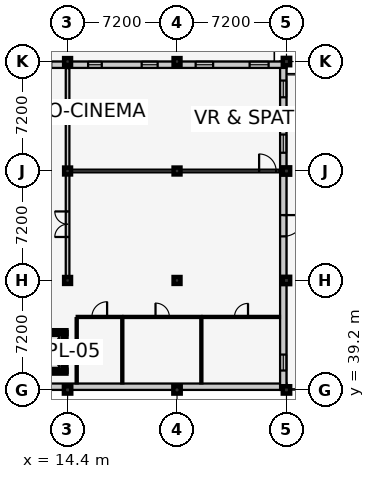
"""IFC4 building model, lengths in metres.
Left out: names, types, materials, properties, quantities, classifications, styles, units other than length and angle.
Written with IfcOpenShell. Run it as: python <this file> out.ifc"""

import sys

from ifc_helpers import new_model, si_unit, direction, frame, frame_2d, origin, origin_2d, place, context, subcontext, project, spatial, rectangle, extrude, element, fill, save


model = new_model("IFC4")
c1 = context("Model", 3, precision=1e-05, world=origin(), true_north=direction((0.0, 1.0)))
c2 = subcontext(c1, "Body", "Model", "MODEL_VIEW")
j1 = project(units=[si_unit("LENGTHUNIT", "METRE"), si_unit("PLANEANGLEUNIT", "RADIAN")], contexts=[c1])
p1 = place(None, origin())
s1 = spatial("IfcSite", under=j1, at=p1, CompositionType="ELEMENT")
p2 = place(p1, origin())
s2 = spatial("IfcBuilding", under=s1, at=p2, CompositionType="ELEMENT")
p3 = place(p2, frame((0.0, 0.0, 13.8)))
s3 = spatial("IfcBuildingStorey", under=s2, at=p3, CompositionType="ELEMENT", Elevation=13.8)
p4 = place(p3, frame((14.4, 39.2, 0.0), z_axis=(0.0, 0.0, 1.0), x_axis=(1.0, 0.0, 0.0)))
e1 = element("IfcColumn", 1, at=p4, inside=s3, PredefinedType="COLUMN", context=c2, shape_type="SweptSolid", body=[
    extrude(rectangle(XDim=0.48, YDim=0.48, at=origin_2d()), origin(), (0.0, 0.0, 1.0), 4.2),
])
for number, where, z_axis, x_axis in (
    (2, (14.4, 46.4, 0.0), (0.0, 0.0, 1.0), (1.0, 0.0, 0.0)),
    (3, (14.4, 53.6, 0.0), (0.0, 0.0, 1.0), (1.0, 0.0, 0.0)),
    (4, (14.4, 60.8, 0.0), (0.0, 0.0, 1.0), (1.0, 0.0, 0.0)),
):
    element("IfcColumn", number, at=place(p3, frame(where, z_axis=z_axis, x_axis=x_axis)), inside=s3, PredefinedType="COLUMN", context=c2, shape_type="SweptSolid", body=[
        extrude(rectangle(XDim=0.45, YDim=0.45, at=origin_2d()), origin(), (0.0, 0.0, 1.0), 4.2),
    ])
p5 = place(p3, frame((21.6, 39.2, 0.0), z_axis=(0.0, 0.0, 1.0), x_axis=(1.0, 0.0, 0.0)))
e5 = element("IfcColumn", 5, at=p5, inside=s3, PredefinedType="COLUMN", context=c2, shape_type="SweptSolid", body=[
    extrude(rectangle(XDim=0.48, YDim=0.48, at=origin_2d()), origin(), (0.0, 0.0, 1.0), 4.2),
])
for number, where, z_axis, x_axis in (
    (6, (21.6, 46.4, 0.0), (0.0, 0.0, 1.0), (1.0, 0.0, 0.0)),
    (7, (21.6, 53.6, 0.0), (0.0, 0.0, 1.0), (1.0, 0.0, 0.0)),
    (8, (21.6, 60.8, 0.0), (0.0, 0.0, 1.0), (1.0, 0.0, 0.0)),
):
    element("IfcColumn", number, at=place(p3, frame(where, z_axis=z_axis, x_axis=x_axis)), inside=s3, PredefinedType="COLUMN", context=c2, shape_type="SweptSolid", body=[
        extrude(rectangle(XDim=0.45, YDim=0.45, at=origin_2d()), origin(), (0.0, 0.0, 1.0), 4.2),
    ])
for number, where, z_axis, x_axis in (
    (9, (28.8, 39.2, 0.0), (0.0, 0.0, 1.0), (1.0, 0.0, 0.0)),
    (10, (28.8, 46.4, 0.0), (0.0, 0.0, 1.0), (1.0, 0.0, 0.0)),
    (11, (28.8, 53.6, 0.0), (0.0, 0.0, 1.0), (1.0, 0.0, 0.0)),
    (12, (28.8, 60.8, 0.0), (0.0, 0.0, 1.0), (1.0, 0.0, 0.0)),
):
    element("IfcColumn", number, at=place(p3, frame(where, z_axis=z_axis, x_axis=x_axis)), inside=s3, PredefinedType="COLUMN", context=c2, shape_type="SweptSolid", body=[
        extrude(rectangle(XDim=0.48, YDim=0.48, at=origin_2d()), origin(), (0.0, 0.0, 1.0), 4.2),
    ])
p6 = place(p3, frame((28.8, 39.41, 0.0), z_axis=(0.0, 0.0, 1.0), x_axis=(-1.0, 0.0, 0.0)))
e13 = element("IfcWall", 13, at=p6, inside=s3, PredefinedType="SOLIDWALL", context=c2, shape_type="SweptSolid", body=[
    extrude(rectangle(XDim=28.8, YDim=0.42, at=frame_2d((14.4, 0.0))), origin(), (0.0, 0.0, 1.0), 3.245),
])
p7 = place(p3, frame((28.59, 60.8, 0.0), z_axis=(0.0, 0.0, 1.0), x_axis=(0.0, -1.0, 0.0)))
e14 = element("IfcWall", 14, at=p7, inside=s3, PredefinedType="SOLIDWALL", context=c2, shape_type="SweptSolid", body=[
    extrude(rectangle(XDim=21.6, YDim=0.42, at=frame_2d((10.8, 0.0))), origin(), (0.0, 0.0, 1.0), 3.205),
])
p8 = place(p7, frame((10.1, 0.0, 0.0)))
e15 = element("IfcOpeningElement", 15, at=p8, cuts=e14, PredefinedType="OPENING", context=c2, shape_type="SweptSolid", body=[
    extrude(rectangle(XDim=1.4, YDim=2.2, at=frame_2d((0.7, 1.1))), frame((0.0, 0.222, 0.0), z_axis=(0.0, -1.0, 0.0), x_axis=(1.0, 0.0, 0.0)), (0.0, 0.0, 1.0), 0.444),
])
p9 = place(p7, frame((1.25, 0.0, 0.9)))
e16 = element("IfcOpeningElement", 16, at=p9, cuts=e14, PredefinedType="OPENING", context=c2, shape_type="SweptSolid", body=[
    extrude(rectangle(XDim=1.1, YDim=1.35, at=frame_2d((0.55, 0.675))), frame((0.0, 0.222, 0.0), z_axis=(0.0, -1.0, 0.0), x_axis=(1.0, 0.0, 0.0)), (0.0, 0.0, 1.0), 0.444),
])
p10 = place(p7, frame((4.8, 0.0, 0.9)))
e17 = element("IfcOpeningElement", 17, at=p10, cuts=e14, PredefinedType="OPENING", context=c2, shape_type="SweptSolid", body=[
    extrude(rectangle(XDim=1.2, YDim=1.35, at=frame_2d((0.6, 0.675))), frame((0.0, 0.222, 0.0), z_axis=(0.0, -1.0, 0.0), x_axis=(1.0, 0.0, 0.0)), (0.0, 0.0, 1.0), 0.444),
])
p11 = place(p7, frame((19.275, 0.0, 0.9)))
e18 = element("IfcOpeningElement", 18, at=p11, cuts=e14, PredefinedType="OPENING", context=c2, shape_type="SweptSolid", body=[
    extrude(rectangle(XDim=1.05, YDim=1.45, at=frame_2d((0.525, 0.725))), frame((0.0, 0.222, 0.0), z_axis=(0.0, -1.0, 0.0), x_axis=(1.0, 0.0, 0.0)), (0.0, 0.0, 1.0), 0.444),
])
p12 = place(p3, frame((0.0, 60.59, 0.0), z_axis=(0.0, 0.0, 1.0), x_axis=(1.0, 0.0, 0.0)))
e19 = element("IfcWall", 19, at=p12, inside=s3, PredefinedType="SOLIDWALL", context=c2, shape_type="SweptSolid", body=[
    extrude(rectangle(XDim=28.8, YDim=0.42, at=frame_2d((14.4, 0.0))), origin(), (0.0, 0.0, 1.0), 3.085),
])
p13 = place(p12, frame((1.225, 0.0, 0.9)))
e20 = element("IfcOpeningElement", 20, at=p13, cuts=e19, PredefinedType="OPENING", context=c2, shape_type="SweptSolid", body=[
    extrude(rectangle(XDim=1.15, YDim=1.45, at=frame_2d((0.575, 0.725))), frame((0.0, 0.222, 0.0), z_axis=(0.0, -1.0, 0.0), x_axis=(1.0, 0.0, 0.0)), (0.0, 0.0, 1.0), 0.444),
])
p14 = place(p12, frame((4.775, 0.0, 0.9)))
e21 = element("IfcOpeningElement", 21, at=p14, cuts=e19, PredefinedType="OPENING", context=c2, shape_type="SweptSolid", body=[
    extrude(rectangle(XDim=1.25, YDim=1.45, at=frame_2d((0.625, 0.725))), frame((0.0, 0.222, 0.0), z_axis=(0.0, -1.0, 0.0), x_axis=(1.0, 0.0, 0.0)), (0.0, 0.0, 1.0), 0.444),
])
p15 = place(p12, frame((8.325, 0.0, 0.9)))
e22 = element("IfcOpeningElement", 22, at=p15, cuts=e19, PredefinedType="OPENING", context=c2, shape_type="SweptSolid", body=[
    extrude(rectangle(XDim=1.35, YDim=1.45, at=frame_2d((0.675, 0.725))), frame((0.0, 0.222, 0.0), z_axis=(0.0, -1.0, 0.0), x_axis=(1.0, 0.0, 0.0)), (0.0, 0.0, 1.0), 0.444),
])
p16 = place(p12, frame((11.875, 0.0, 0.9)))
e23 = element("IfcOpeningElement", 23, at=p16, cuts=e19, PredefinedType="OPENING", context=c2, shape_type="SweptSolid", body=[
    extrude(rectangle(XDim=1.45, YDim=1.45, at=frame_2d((0.725, 0.725))), frame((0.0, 0.222, 0.0), z_axis=(0.0, -1.0, 0.0), x_axis=(1.0, 0.0, 0.0)), (0.0, 0.0, 1.0), 0.444),
])
p17 = place(p12, frame((15.75, 0.0, 0.9)))
e24 = element("IfcOpeningElement", 24, at=p17, cuts=e19, PredefinedType="OPENING", context=c2, shape_type="SweptSolid", body=[
    extrude(rectangle(XDim=0.9, YDim=1.6, at=frame_2d((0.45, 0.8))), frame((0.0, 0.222, 0.0), z_axis=(0.0, -1.0, 0.0), x_axis=(1.0, 0.0, 0.0)), (0.0, 0.0, 1.0), 0.444),
])
p18 = place(p12, frame((19.275, 0.0, 0.9)))
e25 = element("IfcOpeningElement", 25, at=p18, cuts=e19, PredefinedType="OPENING", context=c2, shape_type="SweptSolid", body=[
    extrude(rectangle(XDim=1.05, YDim=1.6, at=frame_2d((0.525, 0.8))), frame((0.0, 0.222, 0.0), z_axis=(0.0, -1.0, 0.0), x_axis=(1.0, 0.0, 0.0)), (0.0, 0.0, 1.0), 0.444),
])
p19 = place(p12, frame((22.825, 0.0, 0.9)))
e26 = element("IfcOpeningElement", 26, at=p19, cuts=e19, PredefinedType="OPENING", context=c2, shape_type="SweptSolid", body=[
    extrude(rectangle(XDim=1.15, YDim=1.6, at=frame_2d((0.575, 0.8))), frame((0.0, 0.222, 0.0), z_axis=(0.0, -1.0, 0.0), x_axis=(1.0, 0.0, 0.0)), (0.0, 0.0, 1.0), 0.444),
])
p20 = place(p12, frame((26.375, 0.0, 0.9)))
e27 = element("IfcOpeningElement", 27, at=p20, cuts=e19, PredefinedType="OPENING", context=c2, shape_type="SweptSolid", body=[
    extrude(rectangle(XDim=1.25, YDim=1.6, at=frame_2d((0.625, 0.8))), frame((0.0, 0.222, 0.0), z_axis=(0.0, -1.0, 0.0), x_axis=(1.0, 0.0, 0.0)), (0.0, 0.0, 1.0), 0.444),
])
p21 = place(p3, frame((12.275, 40.4, 0.0), z_axis=(0.0, 0.0, 1.0), x_axis=(1.0, 0.0, 0.0)))
e28 = element("IfcWall", 28, at=p21, inside=s3, PredefinedType="SHEAR", context=c2, shape_type="SweptSolid", body=[
    extrude(rectangle(XDim=2.05, YDim=0.25, at=frame_2d((1.025, 0.0))), origin(), (0.0, 0.0, 1.0), 3.96),
])
p22 = place(p3, frame((14.325, 43.0, 0.0), z_axis=(0.0, 0.0, 1.0), x_axis=(-1.0, 0.0, 0.0)))
e29 = element("IfcWall", 29, at=p22, inside=s3, PredefinedType="SHEAR", context=c2, shape_type="SweptSolid", body=[
    extrude(rectangle(XDim=2.05, YDim=0.25, at=frame_2d((1.025, 0.0))), origin(), (0.0, 0.0, 1.0), 3.96),
])
p23 = place(p22, frame((0.55, 0.0, 0.0)))
e30 = element("IfcOpeningElement", 30, at=p23, cuts=e29, PredefinedType="OPENING", context=c2, shape_type="SweptSolid", body=[
    extrude(rectangle(XDim=0.95, YDim=2.1, at=frame_2d((0.475, 1.05))), frame((0.0, 0.137, 0.0), z_axis=(0.0, -1.0, 0.0), x_axis=(1.0, 0.0, 0.0)), (0.0, 0.0, 1.0), 0.274),
])
p24 = place(p3, frame((14.2, 40.4, 0.0), z_axis=(0.0, 0.0, 1.0), x_axis=(0.0, 1.0, 0.0)))
e31 = element("IfcWall", 31, at=p24, inside=s3, PredefinedType="SHEAR", context=c2, shape_type="SweptSolid", body=[
    extrude(rectangle(XDim=2.6, YDim=0.25, at=frame_2d((1.3, 0.0))), origin(), (0.0, 0.0, 1.0), 3.96),
])
p25 = place(p3, frame((14.4, 46.6, 0.0), z_axis=(0.0, 0.0, 1.0), x_axis=(0.0, 1.0, 0.0)))
e32 = element("IfcWall", 32, at=p25, inside=s3, PredefinedType="PARTITIONING", context=c2, shape_type="SweptSolid", body=[
    extrude(rectangle(XDim=13.77, YDim=0.24, at=frame_2d((6.885, 0.0))), origin(), (0.0, 0.0, 1.0), 3.335),
])
p26 = place(p25, frame((2.66, 0.0, 0.0)))
e33 = element("IfcOpeningElement", 33, at=p26, cuts=e32, PredefinedType="OPENING", context=c2, shape_type="SweptSolid", body=[
    extrude(rectangle(XDim=1.68, YDim=2.3, at=frame_2d((0.84, 1.15))), frame((0.0, 0.132, 0.0), z_axis=(0.0, -1.0, 0.0), x_axis=(1.0, 0.0, 0.0)), (0.0, 0.0, 1.0), 0.264),
])
p27 = place(p3, frame((14.53, 53.6, 0.0), z_axis=(0.0, 0.0, 1.0), x_axis=(1.0, 0.0, 0.0)))
e34 = element("IfcWall", 34, at=p27, inside=s3, PredefinedType="PARTITIONING", context=c2, shape_type="SweptSolid", body=[
    extrude(rectangle(XDim=13.84, YDim=0.18, at=frame_2d((6.92, 0.0))), origin(), (0.0, 0.0, 1.0), 3.085),
])
p28 = place(p27, frame((12.47, 0.0, 0.0)))
e35 = element("IfcOpeningElement", 35, at=p28, cuts=e34, PredefinedType="OPENING", context=c2, shape_type="SweptSolid", body=[
    extrude(rectangle(XDim=1.12, YDim=2.15, at=frame_2d((0.56, 1.075))), frame((0.0, 0.102, 0.0), z_axis=(0.0, -1.0, 0.0), x_axis=(1.0, 0.0, 0.0)), (0.0, 0.0, 1.0), 0.204),
])
p29 = place(p3, frame((15.0, 44.0, 0.0), z_axis=(0.0, 0.0, 1.0), x_axis=(1.0, 0.0, 0.0)))
e36 = element("IfcWall", 36, at=p29, inside=s3, PredefinedType="PARTITIONING", context=c2, shape_type="SweptSolid", body=[
    extrude(rectangle(XDim=3.0, YDim=0.14, at=frame_2d((1.5, 0.0))), origin(), (0.0, 0.0, 1.0), 3.96),
])
p30 = place(p29, frame((1.0, 0.0, 0.0)))
e37 = element("IfcOpeningElement", 37, at=p30, cuts=e36, PredefinedType="OPENING", context=c2, shape_type="SweptSolid", body=[
    extrude(rectangle(XDim=1.0, YDim=2.1, at=frame_2d((0.5, 1.05))), frame((0.0, 0.082, 0.0), z_axis=(0.0, -1.0, 0.0), x_axis=(1.0, 0.0, 0.0)), (0.0, 0.0, 1.0), 0.164),
])
p31 = place(p3, frame((15.0, 39.63, 0.0), z_axis=(0.0, 0.0, 1.0), x_axis=(0.0, 1.0, 0.0)))
e38 = element("IfcWall", 38, at=p31, inside=s3, PredefinedType="PARTITIONING", context=c2, shape_type="SweptSolid", body=[
    extrude(rectangle(XDim=4.29, YDim=0.14, at=frame_2d((2.145, 0.0))), origin(), (0.0, 0.0, 1.0), 3.96),
])
p32 = place(p3, frame((18.0, 39.63, 0.0), z_axis=(0.0, 0.0, 1.0), x_axis=(0.0, 1.0, 0.0)))
e39 = element("IfcWall", 39, at=p32, inside=s3, PredefinedType="PARTITIONING", context=c2, shape_type="SweptSolid", body=[
    extrude(rectangle(XDim=4.29, YDim=0.14, at=frame_2d((2.145, 0.0))), origin(), (0.0, 0.0, 1.0), 3.764),
])
p33 = place(p3, frame((18.08, 44.0, 0.0), z_axis=(0.0, 0.0, 1.0), x_axis=(1.0, 0.0, 0.0)))
e40 = element("IfcWall", 40, at=p33, inside=s3, PredefinedType="PARTITIONING", context=c2, shape_type="SweptSolid", body=[
    extrude(rectangle(XDim=5.12, YDim=0.14, at=frame_2d((2.56, 0.0))), origin(), (0.0, 0.0, 1.0), 3.96),
])
p34 = place(p33, frame((2.105, 0.0, 0.0)))
e41 = element("IfcOpeningElement", 41, at=p34, cuts=e40, PredefinedType="OPENING", context=c2, shape_type="SweptSolid", body=[
    extrude(rectangle(XDim=0.91, YDim=2.06, at=frame_2d((0.455, 1.03))), frame((0.0, 0.082, 0.0), z_axis=(0.0, -1.0, 0.0), x_axis=(1.0, 0.0, 0.0)), (0.0, 0.0, 1.0), 0.164),
])
p35 = place(p3, frame((23.2, 39.63, 0.0), z_axis=(0.0, 0.0, 1.0), x_axis=(0.0, 1.0, 0.0)))
e42 = element("IfcWall", 42, at=p35, inside=s3, PredefinedType="PARTITIONING", context=c2, shape_type="SweptSolid", body=[
    extrude(rectangle(XDim=4.29, YDim=0.14, at=frame_2d((2.145, 0.0))), origin(), (0.0, 0.0, 1.0), 3.95),
])
p36 = place(p3, frame((23.28, 44.0, 0.0), z_axis=(0.0, 0.0, 1.0), x_axis=(1.0, 0.0, 0.0)))
e43 = element("IfcWall", 43, at=p36, inside=s3, PredefinedType="PARTITIONING", context=c2, shape_type="SweptSolid", body=[
    extrude(rectangle(XDim=5.09, YDim=0.14, at=frame_2d((2.545, 0.0))), origin(), (0.0, 0.0, 1.0), 3.95),
])
p37 = place(p36, frame((2.1, 0.0, 0.0)))
e44 = element("IfcOpeningElement", 44, at=p37, cuts=e43, PredefinedType="OPENING", context=c2, shape_type="SweptSolid", body=[
    extrude(rectangle(XDim=0.89, YDim=2.05, at=frame_2d((0.445, 1.025))), frame((0.0, 0.082, 0.0), z_axis=(0.0, -1.0, 0.0), x_axis=(1.0, 0.0, 0.0)), (0.0, 0.0, 1.0), 0.164),
])
p38 = place(p8, origin())
e45 = element("IfcDoor", 45, at=p38, inside=s3, OperationType="SINGLE_SWING_LEFT", PredefinedType="DOOR", context=c2, shape_type="SweptSolid", body=[
    extrude(rectangle(XDim=1.4, YDim=2.2, at=frame_2d((0.7, 1.1))), frame((0.0, 0.025, 0.0), z_axis=(0.0, -1.0, 0.0), x_axis=(1.0, 0.0, 0.0)), (0.0, 0.0, 1.0), 0.05),
])
fill(e15, e45)
p39 = place(p9, origin())
e46 = element("IfcWindow", 46, at=p39, inside=s3, PartitioningType="SINGLE_PANEL", PredefinedType="WINDOW", context=c2, shape_type="SweptSolid", body=[
    extrude(rectangle(XDim=1.1, YDim=1.35, at=frame_2d((0.55, 0.675))), frame((0.0, 0.03, 0.0), z_axis=(0.0, -1.0, 0.0), x_axis=(1.0, 0.0, 0.0)), (0.0, 0.0, 1.0), 0.06),
])
fill(e16, e46)
p40 = place(p10, origin())
e47 = element("IfcWindow", 47, at=p40, inside=s3, PartitioningType="SINGLE_PANEL", PredefinedType="WINDOW", context=c2, shape_type="SweptSolid", body=[
    extrude(rectangle(XDim=1.2, YDim=1.35, at=frame_2d((0.6, 0.675))), frame((0.0, 0.03, 0.0), z_axis=(0.0, -1.0, 0.0), x_axis=(1.0, 0.0, 0.0)), (0.0, 0.0, 1.0), 0.06),
])
fill(e17, e47)
p41 = place(p11, origin())
e48 = element("IfcWindow", 48, at=p41, inside=s3, PartitioningType="SINGLE_PANEL", PredefinedType="WINDOW", context=c2, shape_type="SweptSolid", body=[
    extrude(rectangle(XDim=1.05, YDim=1.45, at=frame_2d((0.525, 0.725))), frame((0.0, 0.03, 0.0), z_axis=(0.0, -1.0, 0.0), x_axis=(1.0, 0.0, 0.0)), (0.0, 0.0, 1.0), 0.06),
])
fill(e18, e48)
p42 = place(p17, origin())
e49 = element("IfcWindow", 49, at=p42, inside=s3, PartitioningType="SINGLE_PANEL", PredefinedType="WINDOW", context=c2, shape_type="SweptSolid", body=[
    extrude(rectangle(XDim=0.9, YDim=1.6, at=frame_2d((0.45, 0.8))), frame((0.0, 0.03, 0.0), z_axis=(0.0, -1.0, 0.0), x_axis=(1.0, 0.0, 0.0)), (0.0, 0.0, 1.0), 0.06),
])
fill(e24, e49)
p43 = place(p18, origin())
e50 = element("IfcWindow", 50, at=p43, inside=s3, PartitioningType="SINGLE_PANEL", PredefinedType="WINDOW", context=c2, shape_type="SweptSolid", body=[
    extrude(rectangle(XDim=1.05, YDim=1.6, at=frame_2d((0.525, 0.8))), frame((0.0, 0.03, 0.0), z_axis=(0.0, -1.0, 0.0), x_axis=(1.0, 0.0, 0.0)), (0.0, 0.0, 1.0), 0.06),
])
fill(e25, e50)
p44 = place(p19, origin())
e51 = element("IfcWindow", 51, at=p44, inside=s3, PartitioningType="SINGLE_PANEL", PredefinedType="WINDOW", context=c2, shape_type="SweptSolid", body=[
    extrude(rectangle(XDim=1.15, YDim=1.6, at=frame_2d((0.575, 0.8))), frame((0.0, 0.03, 0.0), z_axis=(0.0, -1.0, 0.0), x_axis=(1.0, 0.0, 0.0)), (0.0, 0.0, 1.0), 0.06),
])
fill(e26, e51)
p45 = place(p20, origin())
e52 = element("IfcWindow", 52, at=p45, inside=s3, PartitioningType="SINGLE_PANEL", PredefinedType="WINDOW", context=c2, shape_type="SweptSolid", body=[
    extrude(rectangle(XDim=1.25, YDim=1.6, at=frame_2d((0.625, 0.8))), frame((0.0, 0.03, 0.0), z_axis=(0.0, -1.0, 0.0), x_axis=(1.0, 0.0, 0.0)), (0.0, 0.0, 1.0), 0.06),
])
fill(e27, e52)
p46 = place(p23, origin())
e53 = element("IfcDoor", 53, at=p46, inside=s3, OperationType="SLIDING_TO_LEFT", PredefinedType="DOOR", context=c2, shape_type="SweptSolid", body=[
    extrude(rectangle(XDim=0.95, YDim=2.1, at=frame_2d((0.475, 1.05))), frame((0.0, 0.025, 0.0), z_axis=(0.0, -1.0, 0.0), x_axis=(1.0, 0.0, 0.0)), (0.0, 0.0, 1.0), 0.05),
])
fill(e30, e53)
p47 = place(p26, origin())
e54 = element("IfcDoor", 54, at=p47, inside=s3, OperationType="DOUBLE_DOOR_SINGLE_SWING", PredefinedType="DOOR", context=c2, shape_type="SweptSolid", body=[
    extrude(rectangle(XDim=1.68, YDim=2.3, at=frame_2d((0.84, 1.15))), frame((0.0, 0.025, 0.0), z_axis=(0.0, -1.0, 0.0), x_axis=(1.0, 0.0, 0.0)), (0.0, 0.0, 1.0), 0.05),
])
fill(e33, e54)
p48 = place(p28, origin())
e55 = element("IfcDoor", 55, at=p48, inside=s3, OperationType="SINGLE_SWING_LEFT", PredefinedType="DOOR", context=c2, shape_type="SweptSolid", body=[
    extrude(rectangle(XDim=1.12, YDim=2.15, at=frame_2d((0.56, 1.075))), frame((0.0, 0.025, 0.0), z_axis=(0.0, -1.0, 0.0), x_axis=(1.0, 0.0, 0.0)), (0.0, 0.0, 1.0), 0.05),
])
fill(e35, e55)
p49 = place(p30, origin())
e56 = element("IfcDoor", 56, at=p49, inside=s3, OperationType="SINGLE_SWING_RIGHT", PredefinedType="DOOR", context=c2, shape_type="SweptSolid", body=[
    extrude(rectangle(XDim=1.0, YDim=2.1, at=frame_2d((0.5, 1.05))), frame((0.0, 0.025, 0.0), z_axis=(0.0, -1.0, 0.0), x_axis=(1.0, 0.0, 0.0)), (0.0, 0.0, 1.0), 0.05),
])
fill(e37, e56)
p50 = place(p34, origin())
e57 = element("IfcDoor", 57, at=p50, inside=s3, OperationType="SINGLE_SWING_LEFT", PredefinedType="DOOR", context=c2, shape_type="SweptSolid", body=[
    extrude(rectangle(XDim=0.91, YDim=2.06, at=frame_2d((0.455, 1.03))), frame((0.0, 0.025, 0.0), z_axis=(0.0, -1.0, 0.0), x_axis=(1.0, 0.0, 0.0)), (0.0, 0.0, 1.0), 0.05),
])
fill(e41, e57)
p51 = place(p37, origin())
e58 = element("IfcDoor", 58, at=p51, inside=s3, OperationType="SINGLE_SWING_RIGHT", PredefinedType="DOOR", context=c2, shape_type="SweptSolid", body=[
    extrude(rectangle(XDim=0.89, YDim=2.05, at=frame_2d((0.445, 1.025))), frame((0.0, 0.025, 0.0), z_axis=(0.0, -1.0, 0.0), x_axis=(1.0, 0.0, 0.0)), (0.0, 0.0, 1.0), 0.05),
])
fill(e44, e58)
save(model, sys.argv[1])
